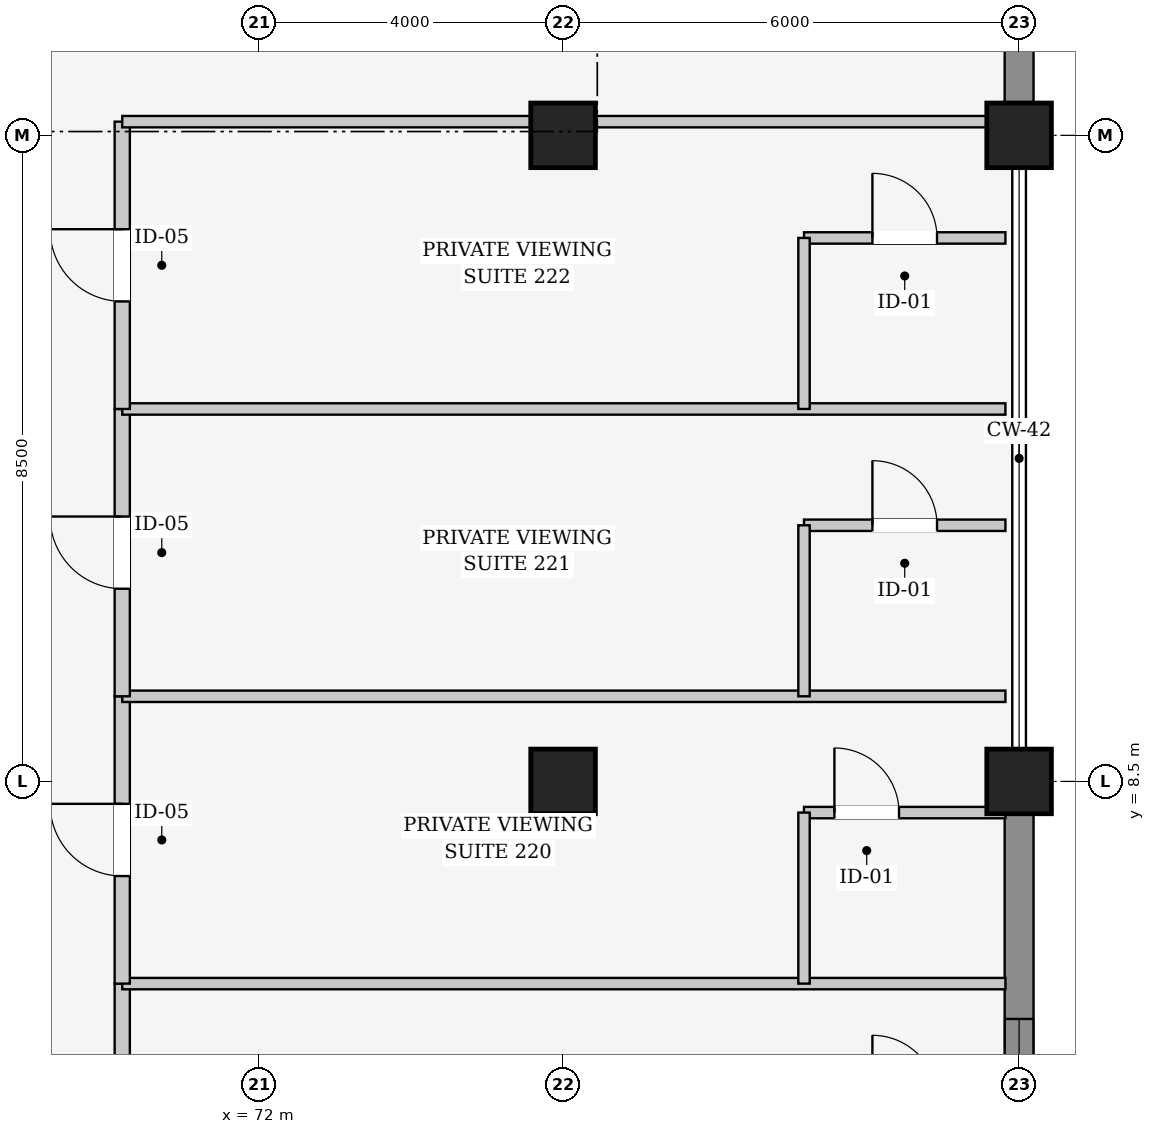
"""IFC4 building model, lengths in metres.
Left out: names, types, materials, properties, quantities, classifications, styles, units other than length and angle.
Written with IfcOpenShell. Run it as: python <this file> out.ifc"""

import sys

from ifc_helpers import new_model, si_unit, direction, frame, frame_2d, origin, origin_2d, place, context, subcontext, project, spatial, rectangle, extrude, element, fill, save


model = new_model("IFC4")
c1 = context("Model", 3, precision=1e-05, world=origin(), true_north=direction((0.0, 1.0)))
c2 = subcontext(c1, "Body", "Model", "MODEL_VIEW")
j1 = project(units=[si_unit("LENGTHUNIT", "METRE"), si_unit("PLANEANGLEUNIT", "RADIAN")], contexts=[c1])
p1 = place(None, origin())
s1 = spatial("IfcSite", under=j1, at=p1, CompositionType="ELEMENT")
p2 = place(p1, origin())
s2 = spatial("IfcBuilding", under=s1, at=p2, CompositionType="ELEMENT")
p3 = place(p2, frame((0.0, 0.0, 11.4)))
s3 = spatial("IfcBuildingStorey", under=s2, at=p3, CompositionType="ELEMENT", Elevation=11.4)
for number, where, z_axis, x_axis in (
    (1, (76.0, 8.5, 0.0), (0.0, 0.0, 1.0), (1.0, 0.0, 0.0)),
    (2, (76.0, 17.0, 0.0), (0.0, 0.0, 1.0), (1.0, 0.0, 0.0)),
    (3, (82.0, 8.5, 0.0), (0.0, 0.0, 1.0), (1.0, 0.0, 0.0)),
    (4, (82.0, 17.0, 0.0), (0.0, 0.0, 1.0), (1.0, 0.0, 0.0)),
):
    element("IfcColumn", number, at=place(p3, frame(where, z_axis=z_axis, x_axis=x_axis)), inside=s3, PredefinedType="COLUMN", context=c2, shape_type="SweptSolid", body=[
        extrude(rectangle(XDim=0.85, YDim=0.85, at=origin_2d()), origin(), (0.0, 0.0, 1.0), 4.8),
    ])
p4 = place(p3, frame((82.0, 8.093, 0.0), z_axis=(0.0, 0.0, 1.0), x_axis=(0.0, -1.0, 0.0)))
e5 = element("IfcWall", 5, at=p4, inside=s3, PredefinedType="SOLIDWALL", context=c2, shape_type="SweptSolid", body=[
    extrude(rectangle(XDim=7.686, YDim=0.38, at=frame_2d((3.843, 0.0))), origin(), (0.0, 0.0, 1.0), 3.76),
])
p5 = place(p4, frame((2.718, 0.0, 0.9)))
e6 = element("IfcOpeningElement", 6, at=p5, cuts=e5, PredefinedType="OPENING", context=c2, shape_type="SweptSolid", body=[
    extrude(rectangle(XDim=2.25, YDim=2.5, at=frame_2d((1.125, 1.25))), frame((0.0, 0.2, 0.0), z_axis=(0.0, -1.0, 0.0), x_axis=(1.0, 0.0, 0.0)), (0.0, 0.0, 1.0), 0.4),
])
p6 = place(p3, frame((82.0, 24.593, 0.0), z_axis=(0.0, 0.0, 1.0), x_axis=(0.0, -1.0, 0.0)))
e7 = element("IfcWall", 7, at=p6, inside=s3, PredefinedType="SOLIDWALL", context=c2, shape_type="SweptSolid", body=[
    extrude(rectangle(XDim=7.186, YDim=0.38, at=frame_2d((3.593, 0.0))), origin(), (0.0, 0.0, 1.0), 3.76),
])
p7 = place(p6, frame((2.343, 0.0, 0.9)))
e8 = element("IfcOpeningElement", 8, at=p7, cuts=e7, PredefinedType="OPENING", context=c2, shape_type="SweptSolid", body=[
    extrude(rectangle(XDim=2.5, YDim=2.5, at=frame_2d((1.25, 1.25))), frame((0.0, 0.2, 0.0), z_axis=(0.0, -1.0, 0.0), x_axis=(1.0, 0.0, 0.0)), (0.0, 0.0, 1.0), 0.4),
])
p8 = place(p3, frame((70.2, 2.06, 0.0), z_axis=(0.0, 0.0, 1.0), x_axis=(0.0, 1.0, 0.0)))
e9 = element("IfcWall", 9, at=p8, inside=s3, PredefinedType="PARTITIONING", context=c2, shape_type="SweptSolid", body=[
    extrude(rectangle(XDim=3.78, YDim=0.2, at=frame_2d((1.89, 0.0))), origin(), (0.0, 0.0, 1.0), 4.14),
])
p9 = place(p8, frame((1.415, 0.0, 0.0)))
e10 = element("IfcOpeningElement", 10, at=p9, cuts=e9, PredefinedType="OPENING", context=c2, shape_type="SweptSolid", body=[
    extrude(rectangle(XDim=0.95, YDim=2.25, at=frame_2d((0.475, 1.125))), frame((0.0, 0.11, 0.0), z_axis=(0.0, -1.0, 0.0), x_axis=(1.0, 0.0, 0.0)), (0.0, 0.0, 1.0), 0.22),
])
p10 = place(p3, frame((70.2, 5.84, 0.0), z_axis=(0.0, 0.0, 1.0), x_axis=(1.0, 0.0, 0.0)))
e11 = element("IfcWall", 11, at=p10, inside=s3, PredefinedType="PARTITIONING", context=c2, shape_type="SweptSolid", body=[
    extrude(rectangle(XDim=11.62, YDim=0.15, at=frame_2d((5.81, 0.0))), origin(), (0.0, 0.0, 1.0), 3.845),
])
p11 = place(p3, frame((79.17, 8.09, 0.0), z_axis=(0.0, 0.0, 1.0), x_axis=(1.0, 0.0, 0.0)))
e12 = element("IfcWall", 12, at=p11, inside=s3, PredefinedType="PARTITIONING", context=c2, shape_type="SweptSolid", body=[
    extrude(rectangle(XDim=2.65, YDim=0.15, at=frame_2d((1.325, 0.0))), origin(), (0.0, 0.0, 1.0), 3.745),
])
p12 = place(p11, frame((0.4, 0.0, 0.0)))
e13 = element("IfcOpeningElement", 13, at=p12, cuts=e12, PredefinedType="OPENING", context=c2, shape_type="SweptSolid", body=[
    extrude(rectangle(XDim=0.85, YDim=2.15, at=frame_2d((0.425, 1.075))), frame((0.0, 0.085, 0.0), z_axis=(0.0, -1.0, 0.0), x_axis=(1.0, 0.0, 0.0)), (0.0, 0.0, 1.0), 0.17),
])
p13 = place(p3, frame((79.17, 5.84, 0.0), z_axis=(0.0, 0.0, 1.0), x_axis=(0.0, 1.0, 0.0)))
e14 = element("IfcWall", 14, at=p13, inside=s3, PredefinedType="PARTITIONING", context=c2, shape_type="SweptSolid", body=[
    extrude(rectangle(XDim=2.25, YDim=0.15, at=frame_2d((1.125, 0.0))), origin(), (0.0, 0.0, 1.0), 3.745),
])
p14 = place(p3, frame((70.2, 5.84, 0.0), z_axis=(0.0, 0.0, 1.0), x_axis=(0.0, 1.0, 0.0)))
e15 = element("IfcWall", 15, at=p14, inside=s3, PredefinedType="PARTITIONING", context=c2, shape_type="SweptSolid", body=[
    extrude(rectangle(XDim=3.78, YDim=0.2, at=frame_2d((1.89, 0.0))), origin(), (0.0, 0.0, 1.0), 3.545),
])
p15 = place(p14, frame((1.415, 0.0, 0.0)))
e16 = element("IfcOpeningElement", 16, at=p15, cuts=e15, PredefinedType="OPENING", context=c2, shape_type="SweptSolid", body=[
    extrude(rectangle(XDim=0.95, YDim=2.25, at=frame_2d((0.475, 1.125))), frame((0.0, 0.11, 0.0), z_axis=(0.0, -1.0, 0.0), x_axis=(1.0, 0.0, 0.0)), (0.0, 0.0, 1.0), 0.22),
])
p16 = place(p3, frame((70.2, 9.62, 0.0), z_axis=(0.0, 0.0, 1.0), x_axis=(1.0, 0.0, 0.0)))
e17 = element("IfcWall", 17, at=p16, inside=s3, PredefinedType="PARTITIONING", context=c2, shape_type="SweptSolid", body=[
    extrude(rectangle(XDim=11.62, YDim=0.15, at=frame_2d((5.81, 0.0))), origin(), (0.0, 0.0, 1.0), 3.845),
])
p17 = place(p3, frame((79.17, 11.87, 0.0), z_axis=(0.0, 0.0, 1.0), x_axis=(1.0, 0.0, 0.0)))
e18 = element("IfcWall", 18, at=p17, inside=s3, PredefinedType="PARTITIONING", context=c2, shape_type="SweptSolid", body=[
    extrude(rectangle(XDim=2.65, YDim=0.15, at=frame_2d((1.325, 0.0))), origin(), (0.0, 0.0, 1.0), 3.845),
])
p18 = place(p17, frame((0.9, 0.0, 0.0)))
e19 = element("IfcOpeningElement", 19, at=p18, cuts=e18, PredefinedType="OPENING", context=c2, shape_type="SweptSolid", body=[
    extrude(rectangle(XDim=0.85, YDim=2.15, at=frame_2d((0.425, 1.075))), frame((0.0, 0.085, 0.0), z_axis=(0.0, -1.0, 0.0), x_axis=(1.0, 0.0, 0.0)), (0.0, 0.0, 1.0), 0.17),
])
p19 = place(p3, frame((79.17, 9.62, 0.0), z_axis=(0.0, 0.0, 1.0), x_axis=(0.0, 1.0, 0.0)))
e20 = element("IfcWall", 20, at=p19, inside=s3, PredefinedType="PARTITIONING", context=c2, shape_type="SweptSolid", body=[
    extrude(rectangle(XDim=2.25, YDim=0.15, at=frame_2d((1.125, 0.0))), origin(), (0.0, 0.0, 1.0), 4.44),
])
p20 = place(p3, frame((70.2, 9.62, 0.0), z_axis=(0.0, 0.0, 1.0), x_axis=(0.0, 1.0, 0.0)))
e21 = element("IfcWall", 21, at=p20, inside=s3, PredefinedType="PARTITIONING", context=c2, shape_type="SweptSolid", body=[
    extrude(rectangle(XDim=3.78, YDim=0.2, at=frame_2d((1.89, 0.0))), origin(), (0.0, 0.0, 1.0), 4.14),
])
p21 = place(p20, frame((1.415, 0.0, 0.0)))
e22 = element("IfcOpeningElement", 22, at=p21, cuts=e21, PredefinedType="OPENING", context=c2, shape_type="SweptSolid", body=[
    extrude(rectangle(XDim=0.95, YDim=2.25, at=frame_2d((0.475, 1.125))), frame((0.0, 0.11, 0.0), z_axis=(0.0, -1.0, 0.0), x_axis=(1.0, 0.0, 0.0)), (0.0, 0.0, 1.0), 0.22),
])
p22 = place(p3, frame((70.2, 13.4, 0.0), z_axis=(0.0, 0.0, 1.0), x_axis=(1.0, 0.0, 0.0)))
e23 = element("IfcWall", 23, at=p22, inside=s3, PredefinedType="PARTITIONING", context=c2, shape_type="SweptSolid", body=[
    extrude(rectangle(XDim=11.62, YDim=0.15, at=frame_2d((5.81, 0.0))), origin(), (0.0, 0.0, 1.0), 3.845),
])
p23 = place(p3, frame((79.17, 15.65, 0.0), z_axis=(0.0, 0.0, 1.0), x_axis=(1.0, 0.0, 0.0)))
e24 = element("IfcWall", 24, at=p23, inside=s3, PredefinedType="PARTITIONING", context=c2, shape_type="SweptSolid", body=[
    extrude(rectangle(XDim=2.65, YDim=0.15, at=frame_2d((1.325, 0.0))), origin(), (0.0, 0.0, 1.0), 3.845),
])
p24 = place(p23, frame((0.9, 0.0, 0.0)))
e25 = element("IfcOpeningElement", 25, at=p24, cuts=e24, PredefinedType="OPENING", context=c2, shape_type="SweptSolid", body=[
    extrude(rectangle(XDim=0.85, YDim=2.15, at=frame_2d((0.425, 1.075))), frame((0.0, 0.085, 0.0), z_axis=(0.0, -1.0, 0.0), x_axis=(1.0, 0.0, 0.0)), (0.0, 0.0, 1.0), 0.17),
])
p25 = place(p3, frame((79.17, 13.4, 0.0), z_axis=(0.0, 0.0, 1.0), x_axis=(0.0, 1.0, 0.0)))
e26 = element("IfcWall", 26, at=p25, inside=s3, PredefinedType="PARTITIONING", context=c2, shape_type="SweptSolid", body=[
    extrude(rectangle(XDim=2.25, YDim=0.15, at=frame_2d((1.125, 0.0))), origin(), (0.0, 0.0, 1.0), 4.44),
])
p26 = place(p3, frame((70.2, 13.4, 0.0), z_axis=(0.0, 0.0, 1.0), x_axis=(0.0, 1.0, 0.0)))
e27 = element("IfcWall", 27, at=p26, inside=s3, PredefinedType="PARTITIONING", context=c2, shape_type="SweptSolid", body=[
    extrude(rectangle(XDim=3.78, YDim=0.2, at=frame_2d((1.89, 0.0))), origin(), (0.0, 0.0, 1.0), 3.545),
])
p27 = place(p26, frame((1.415, 0.0, 0.0)))
e28 = element("IfcOpeningElement", 28, at=p27, cuts=e27, PredefinedType="OPENING", context=c2, shape_type="SweptSolid", body=[
    extrude(rectangle(XDim=0.95, YDim=2.25, at=frame_2d((0.475, 1.125))), frame((0.0, 0.11, 0.0), z_axis=(0.0, -1.0, 0.0), x_axis=(1.0, 0.0, 0.0)), (0.0, 0.0, 1.0), 0.22),
])
p28 = place(p3, frame((70.2, 17.18, 0.0), z_axis=(0.0, 0.0, 1.0), x_axis=(1.0, 0.0, 0.0)))
e29 = element("IfcWall", 29, at=p28, inside=s3, PredefinedType="PARTITIONING", context=c2, shape_type="SweptSolid", body=[
    extrude(rectangle(XDim=11.62, YDim=0.15, at=frame_2d((5.81, 0.0))), origin(), (0.0, 0.0, 1.0), 3.545),
])
p29 = place(p5, origin())
e30 = element("IfcWindow", 30, at=p29, inside=s3, PartitioningType="SINGLE_PANEL", PredefinedType="WINDOW", context=c2, shape_type="SweptSolid", body=[
    extrude(rectangle(XDim=2.25, YDim=2.5, at=frame_2d((1.125, 1.25))), frame((0.0, 0.03, 0.0), z_axis=(0.0, -1.0, 0.0), x_axis=(1.0, 0.0, 0.0)), (0.0, 0.0, 1.0), 0.06),
])
fill(e6, e30)
p30 = place(p12, origin())
e31 = element("IfcDoor", 31, at=p30, inside=s3, OperationType="SINGLE_SWING_LEFT", PredefinedType="DOOR", context=c2, shape_type="SweptSolid", body=[
    extrude(rectangle(XDim=0.85, YDim=2.15, at=frame_2d((0.425, 1.075))), frame((0.0, 0.025, 0.0), z_axis=(0.0, -1.0, 0.0), x_axis=(1.0, 0.0, 0.0)), (0.0, 0.0, 1.0), 0.05),
])
fill(e13, e31)
p31 = place(p15, origin())
e32 = element("IfcDoor", 32, at=p31, inside=s3, OperationType="SINGLE_SWING_RIGHT", PredefinedType="DOOR", context=c2, shape_type="SweptSolid", body=[
    extrude(rectangle(XDim=0.95, YDim=2.25, at=frame_2d((0.475, 1.125))), frame((0.0, 0.025, 0.0), z_axis=(0.0, -1.0, 0.0), x_axis=(1.0, 0.0, 0.0)), (0.0, 0.0, 1.0), 0.05),
])
fill(e16, e32)
p32 = place(p18, origin())
e33 = element("IfcDoor", 33, at=p32, inside=s3, OperationType="SINGLE_SWING_LEFT", PredefinedType="DOOR", context=c2, shape_type="SweptSolid", body=[
    extrude(rectangle(XDim=0.85, YDim=2.15, at=frame_2d((0.425, 1.075))), frame((0.0, 0.025, 0.0), z_axis=(0.0, -1.0, 0.0), x_axis=(1.0, 0.0, 0.0)), (0.0, 0.0, 1.0), 0.05),
])
fill(e19, e33)
p33 = place(p21, origin())
e34 = element("IfcDoor", 34, at=p33, inside=s3, OperationType="SINGLE_SWING_RIGHT", PredefinedType="DOOR", context=c2, shape_type="SweptSolid", body=[
    extrude(rectangle(XDim=0.95, YDim=2.25, at=frame_2d((0.475, 1.125))), frame((0.0, 0.025, 0.0), z_axis=(0.0, -1.0, 0.0), x_axis=(1.0, 0.0, 0.0)), (0.0, 0.0, 1.0), 0.05),
])
fill(e22, e34)
p34 = place(p24, origin())
e35 = element("IfcDoor", 35, at=p34, inside=s3, OperationType="SINGLE_SWING_LEFT", PredefinedType="DOOR", context=c2, shape_type="SweptSolid", body=[
    extrude(rectangle(XDim=0.85, YDim=2.15, at=frame_2d((0.425, 1.075))), frame((0.0, 0.025, 0.0), z_axis=(0.0, -1.0, 0.0), x_axis=(1.0, 0.0, 0.0)), (0.0, 0.0, 1.0), 0.05),
])
fill(e25, e35)
p35 = place(p27, origin())
e36 = element("IfcDoor", 36, at=p35, inside=s3, OperationType="SINGLE_SWING_RIGHT", PredefinedType="DOOR", context=c2, shape_type="SweptSolid", body=[
    extrude(rectangle(XDim=0.95, YDim=2.25, at=frame_2d((0.475, 1.125))), frame((0.0, 0.025, 0.0), z_axis=(0.0, -1.0, 0.0), x_axis=(1.0, 0.0, 0.0)), (0.0, 0.0, 1.0), 0.05),
])
fill(e28, e36)
save(model, sys.argv[1])
